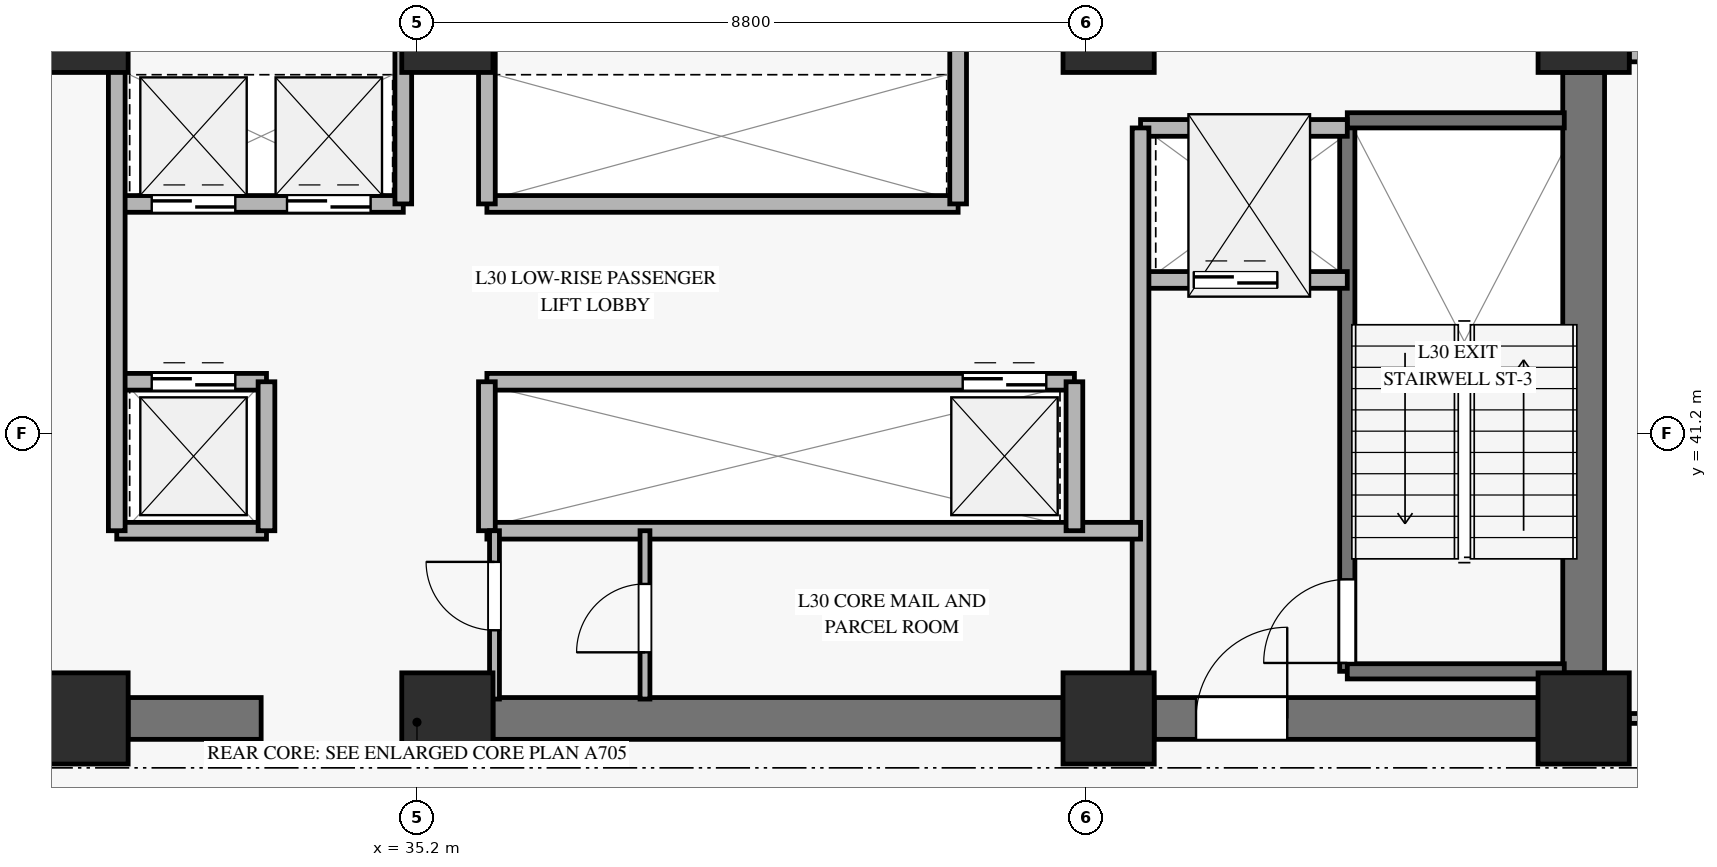
"""IFC4 building model, lengths in metres.
Left out: names, types, materials, properties, quantities, classifications, styles, units other than length and angle.
Written with IfcOpenShell. Run it as: python <this file> out.ifc"""

import sys

from ifc_helpers import new_model, si_unit, direction, frame, frame_2d, origin, origin_2d, place, context, subcontext, project, spatial, rectangle, extrude, source, transform, mapped, element, fill, save


model = new_model("IFC4")
c1 = context("Model", 3, precision=1e-05, world=origin(), true_north=direction((0.0, 1.0)))
c2 = subcontext(c1, "Body", "Model", "MODEL_VIEW")
j1 = project(units=[si_unit("LENGTHUNIT", "METRE"), si_unit("PLANEANGLEUNIT", "RADIAN")], contexts=[c1])
p1 = place(None, origin())
s1 = spatial("IfcSite", under=j1, at=p1, CompositionType="ELEMENT")
p2 = place(p1, origin())
s2 = spatial("IfcBuilding", under=s1, at=p2, CompositionType="ELEMENT")
p3 = place(p2, frame((0.0, 0.0, 123.1)))
s3 = spatial("IfcBuildingStorey", under=s2, at=p3, CompositionType="ELEMENT", Elevation=123.1)
m1 = source(origin(), c2, "Body", "SweptSolid", [
    extrude(rectangle(XDim=1.2, YDim=1.2, at=origin_2d()), origin(), (0.0, 0.0, 1.0), 3.68),
])
for number, where, z_axis, x_axis in (
    (1, (30.8, 37.45, 0.0), (0.0, 0.0, 1.0), (1.0, 0.0, 0.0)),
    (2, (30.8, 46.55, 0.0), (0.0, 0.0, 1.0), (1.0, 0.0, 0.0)),
    (3, (35.6, 37.45, 0.0), (0.0, 0.0, 1.0), (1.0, 0.0, 0.0)),
    (4, (35.6, 46.55, 0.0), (0.0, 0.0, 1.0), (1.0, 0.0, 0.0)),
    (5, (44.3, 37.45, 0.0), (0.0, 0.0, 1.0), (1.0, 0.0, 0.0)),
    (6, (44.3, 46.55, 0.0), (0.0, 0.0, 1.0), (1.0, 0.0, 0.0)),
    (7, (50.55, 37.45, 0.0), (0.0, 0.0, 1.0), (1.0, 0.0, 0.0)),
    (8, (50.55, 46.55, 0.0), (0.0, 0.0, 1.0), (1.0, 0.0, 0.0)),
):
    element("IfcColumn", number, at=place(p3, frame(where, z_axis=z_axis, x_axis=x_axis)), inside=s3, PredefinedType="PILASTER", context=c2, shape_type="MappedRepresentation", body=[
        mapped(m1, transform((0.0, 0.0, 0.0), x_axis=(1.0, 0.0, 0.0), y_axis=(0.0, 1.0, 0.0), z_axis=(0.0, 0.0, 1.0), scale=1.0)),
    ])
p4 = place(p3, frame((31.4, 37.45, 0.0), z_axis=(0.0, 0.0, 1.0), x_axis=(1.0, 0.0, 0.0)))
e9 = element("IfcWall", 9, at=p4, inside=s3, PredefinedType="SHEAR", context=c2, shape_type="SweptSolid", body=[
    extrude(rectangle(XDim=1.75, YDim=0.55, at=frame_2d((0.875, 0.0))), origin(), (0.0, 0.0, 1.0), 3.68),
])
p5 = place(p3, frame((36.2, 37.45, 0.0), z_axis=(0.0, 0.0, 1.0), x_axis=(1.0, 0.0, 0.0)))
e10 = element("IfcWall", 10, at=p5, inside=s3, PredefinedType="SHEAR", context=c2, shape_type="SweptSolid", body=[
    extrude(rectangle(XDim=7.5, YDim=0.55, at=frame_2d((3.75, 0.0))), origin(), (0.0, 0.0, 1.0), 3.68),
])
p6 = place(p3, frame((44.9, 37.45, 0.0), z_axis=(0.0, 0.0, 1.0), x_axis=(1.0, 0.0, 0.0)))
e11 = element("IfcWall", 11, at=p6, inside=s3, PredefinedType="SHEAR", context=c2, shape_type="SweptSolid", body=[
    extrude(rectangle(XDim=5.05, YDim=0.55, at=frame_2d((2.525, 0.0))), origin(), (0.0, 0.0, 1.0), 3.68),
])
p7 = place(p6, frame((0.55, 0.0, 0.0)))
e12 = element("IfcOpeningElement", 12, at=p7, cuts=e11, PredefinedType="OPENING", context=c2, shape_type="SweptSolid", body=[
    extrude(rectangle(XDim=1.2, YDim=2.15, at=frame_2d((0.6, 1.075))), frame((0.0, 0.285, 0.0), z_axis=(0.0, -1.0, 0.0), x_axis=(1.0, 0.0, 0.0)), (0.0, 0.0, 1.0), 0.57),
])
p8 = place(p3, frame((50.55, 38.05, 0.0), z_axis=(0.0, 0.0, 1.0), x_axis=(0.0, 1.0, 0.0)))
e13 = element("IfcWall", 13, at=p8, inside=s3, PredefinedType="SHEAR", context=c2, shape_type="SweptSolid", body=[
    extrude(rectangle(XDim=7.9, YDim=0.55, at=frame_2d((3.95, 0.0))), origin(), (0.0, 0.0, 1.0), 3.68),
])
p9 = place(p3, frame((51.15, 46.25, 0.0), z_axis=(0.0, 0.0, 1.0), x_axis=(1.0, 0.0, 0.0)))
e14 = element("IfcWall", 14, at=p9, inside=s3, PredefinedType="SOLIDWALL", context=c2, shape_type="SweptSolid", body=[
    extrude(rectangle(XDim=10.83, YDim=0.32, at=frame_2d((5.415, 0.0))), origin(), (0.0, 0.0, 1.0), 3.16),
])
p10 = place(p9, frame((4.615, 0.0, 0.45)))
e15 = element("IfcOpeningElement", 15, at=p10, cuts=e14, PredefinedType="OPENING", context=c2, shape_type="SweptSolid", body=[
    extrude(rectangle(XDim=1.6, YDim=2.0, at=frame_2d((0.8, 1.0))), frame((0.0, 0.17, 0.0), z_axis=(0.0, -1.0, 0.0), x_axis=(1.0, 0.0, 0.0)), (0.0, 0.0, 1.0), 0.34),
])
p11 = place(p3, frame((47.44, 38.07, 0.0), z_axis=(0.0, 0.0, 1.0), x_axis=(0.0, 1.0, 0.0)))
e16 = element("IfcWall", 16, at=p11, inside=s3, PredefinedType="SOLIDWALL", context=c2, shape_type="SweptSolid", body=[
    extrude(rectangle(XDim=7.25, YDim=0.2, at=frame_2d((3.625, 0.0))), origin(), (0.0, 0.0, 1.0), 3.9),
])
p12 = place(p11, frame((0.11, 0.0, 0.0)))
e17 = element("IfcOpeningElement", 17, at=p12, cuts=e16, PredefinedType="OPENING", context=c2, shape_type="SweptSolid", body=[
    extrude(rectangle(XDim=1.1, YDim=2.15, at=frame_2d((0.55, 1.075))), frame((0.0, 0.11, 0.0), z_axis=(0.0, -1.0, 0.0), x_axis=(1.0, 0.0, 0.0)), (0.0, 0.0, 1.0), 0.22),
])
for number, where, z_axis, x_axis in (
    (18, (47.44, 45.32, 0.0), (0.0, 0.0, 1.0), (1.0, 0.0, 0.0)),
    (19, (47.44, 38.07, 0.0), (0.0, 0.0, 1.0), (1.0, 0.0, 0.0)),
):
    element("IfcWall", number, at=place(p3, frame(where, z_axis=z_axis, x_axis=x_axis)), inside=s3, PredefinedType="SOLIDWALL", context=c2, shape_type="SweptSolid", body=[
        extrude(rectangle(XDim=2.855, YDim=0.2, at=frame_2d((1.427, 0.0))), origin(), (0.0, 0.0, 1.0), 3.9),
    ])
p13 = place(p3, frame((44.72, 43.22, 0.0), z_axis=(0.0, 0.0, 1.0), x_axis=(1.0, 0.0, 0.0)))
e20 = element("IfcWall", 20, at=p13, inside=s3, PredefinedType="SOLIDWALL", context=c2, shape_type="SweptSolid", body=[
    extrude(rectangle(XDim=2.72, YDim=0.22, at=frame_2d((1.36, 0.0))), origin(), (0.0, 0.0, 1.0), 3.68),
])
p14 = place(p13, frame((0.7, 0.0, 0.0)))
e21 = element("IfcOpeningElement", 21, at=p14, cuts=e20, PredefinedType="OPENING", context=c2, shape_type="SweptSolid", body=[
    extrude(rectangle(XDim=1.1, YDim=2.2, at=frame_2d((0.55, 1.1))), frame((0.0, 0.12, 0.0), z_axis=(0.0, -1.0, 0.0), x_axis=(1.0, 0.0, 0.0)), (0.0, 0.0, 1.0), 0.24),
])
p15 = place(p3, frame((44.72, 45.22, 0.0), z_axis=(0.0, 0.0, 1.0), x_axis=(1.0, 0.0, 0.0)))
e22 = element("IfcWall", 22, at=p15, inside=s3, PredefinedType="SOLIDWALL", context=c2, shape_type="SweptSolid", body=[
    extrude(rectangle(XDim=2.72, YDim=0.22, at=frame_2d((1.36, 0.0))), origin(), (0.0, 0.0, 1.0), 3.68),
])
p16 = place(p3, frame((44.72, 37.705, 0.0), z_axis=(0.0, 0.0, 1.0), x_axis=(0.0, 1.0, 0.0)))
e23 = element("IfcWall", 23, at=p16, inside=s3, PredefinedType="SOLIDWALL", context=c2, shape_type="SweptSolid", body=[
    extrude(rectangle(XDim=7.515, YDim=0.22, at=frame_2d((3.757, 0.0))), origin(), (0.0, 0.0, 1.0), 3.68),
])
p17 = place(p3, frame((31.25, 44.22, 0.0), z_axis=(0.0, 0.0, 1.0), x_axis=(1.0, 0.0, 0.0)))
e24 = element("IfcWall", 24, at=p17, inside=s3, PredefinedType="SOLIDWALL", context=c2, shape_type="SweptSolid", body=[
    extrude(rectangle(XDim=3.77, YDim=0.22, at=frame_2d((1.885, 0.0))), origin(), (0.0, 0.0, 1.0), 3.68),
])
p18 = place(p17, frame((0.46, 0.0, 0.0)))
e25 = element("IfcOpeningElement", 25, at=p18, cuts=e24, PredefinedType="OPENING", context=c2, shape_type="SweptSolid", body=[
    extrude(rectangle(XDim=1.1, YDim=2.2, at=frame_2d((0.55, 1.1))), frame((0.0, 0.12, 0.0), z_axis=(0.0, -1.0, 0.0), x_axis=(1.0, 0.0, 0.0)), (0.0, 0.0, 1.0), 0.24),
])
p19 = place(p17, frame((2.24, 0.0, 0.0)))
e26 = element("IfcOpeningElement", 26, at=p19, cuts=e24, PredefinedType="OPENING", context=c2, shape_type="SweptSolid", body=[
    extrude(rectangle(XDim=1.1, YDim=2.2, at=frame_2d((0.55, 1.1))), frame((0.0, 0.12, 0.0), z_axis=(0.0, -1.0, 0.0), x_axis=(1.0, 0.0, 0.0)), (0.0, 0.0, 1.0), 0.24),
])
p20 = place(p3, frame((36.12, 44.22, 0.0), z_axis=(0.0, 0.0, 1.0), x_axis=(1.0, 0.0, 0.0)))
e27 = element("IfcWall", 27, at=p20, inside=s3, PredefinedType="SOLIDWALL", context=c2, shape_type="SweptSolid", body=[
    extrude(rectangle(XDim=6.2, YDim=0.22, at=frame_2d((3.1, 0.0))), origin(), (0.0, 0.0, 1.0), 3.68),
])
for number, where, z_axis, x_axis in (
    (28, (35.02, 44.22, 0.0), (0.0, 0.0, 1.0), (0.0, 1.0, 0.0)),
    (29, (36.12, 44.22, 0.0), (0.0, 0.0, 1.0), (0.0, 1.0, 0.0)),
    (30, (42.32, 44.22, 0.0), (0.0, 0.0, 1.0), (0.0, 1.0, 0.0)),
):
    element("IfcWall", number, at=place(p3, frame(where, z_axis=z_axis, x_axis=x_axis)), inside=s3, PredefinedType="SOLIDWALL", context=c2, shape_type="SweptSolid", body=[
        extrude(rectangle(XDim=2.075, YDim=0.22, at=frame_2d((1.038, 0.0))), origin(), (0.0, 0.0, 1.0), 3.68),
    ])
p21 = place(p3, frame((31.25, 41.88, 0.0), z_axis=(0.0, 0.0, 1.0), x_axis=(1.0, 0.0, 0.0)))
e31 = element("IfcWall", 31, at=p21, inside=s3, PredefinedType="SOLIDWALL", context=c2, shape_type="SweptSolid", body=[
    extrude(rectangle(XDim=1.97, YDim=0.22, at=frame_2d((0.985, 0.0))), origin(), (0.0, 0.0, 1.0), 3.68),
])
p22 = place(p21, frame((0.46, 0.0, 0.0)))
e32 = element("IfcOpeningElement", 32, at=p22, cuts=e31, PredefinedType="OPENING", context=c2, shape_type="SweptSolid", body=[
    extrude(rectangle(XDim=1.1, YDim=2.2, at=frame_2d((0.55, 1.1))), frame((0.0, 0.12, 0.0), z_axis=(0.0, -1.0, 0.0), x_axis=(1.0, 0.0, 0.0)), (0.0, 0.0, 1.0), 0.24),
])
p23 = place(p3, frame((36.12, 41.88, 0.0), z_axis=(0.0, 0.0, 1.0), x_axis=(1.0, 0.0, 0.0)))
e33 = element("IfcWall", 33, at=p23, inside=s3, PredefinedType="SOLIDWALL", context=c2, shape_type="SweptSolid", body=[
    extrude(rectangle(XDim=7.73, YDim=0.22, at=frame_2d((3.865, 0.0))), origin(), (0.0, 0.0, 1.0), 3.68),
])
p24 = place(p23, frame((6.26, 0.0, 0.0)))
e34 = element("IfcOpeningElement", 34, at=p24, cuts=e33, PredefinedType="OPENING", context=c2, shape_type="SweptSolid", body=[
    extrude(rectangle(XDim=1.1, YDim=2.2, at=frame_2d((0.55, 1.1))), frame((0.0, 0.12, 0.0), z_axis=(0.0, -1.0, 0.0), x_axis=(1.0, 0.0, 0.0)), (0.0, 0.0, 1.0), 0.24),
])
p25 = place(p3, frame((31.25, 39.92, 0.0), z_axis=(0.0, 0.0, 1.0), x_axis=(1.0, 0.0, 0.0)))
e35 = element("IfcWall", 35, at=p25, inside=s3, PredefinedType="SOLIDWALL", context=c2, shape_type="SweptSolid", body=[
    extrude(rectangle(XDim=1.97, YDim=0.22, at=frame_2d((0.985, 0.0))), origin(), (0.0, 0.0, 1.0), 3.68),
])
p26 = place(p3, frame((33.22, 39.92, 0.0), z_axis=(0.0, 0.0, 1.0), x_axis=(0.0, 1.0, 0.0)))
e36 = element("IfcWall", 36, at=p26, inside=s3, PredefinedType="SOLIDWALL", context=c2, shape_type="SweptSolid", body=[
    extrude(rectangle(XDim=1.96, YDim=0.22, at=frame_2d((0.98, 0.0))), origin(), (0.0, 0.0, 1.0), 3.68),
])
p27 = place(p3, frame((36.12, 39.92, 0.0), z_axis=(0.0, 0.0, 1.0), x_axis=(1.0, 0.0, 0.0)))
e37 = element("IfcWall", 37, at=p27, inside=s3, PredefinedType="SOLIDWALL", context=c2, shape_type="SweptSolid", body=[
    extrude(rectangle(XDim=8.6, YDim=0.22, at=frame_2d((4.3, 0.0))), origin(), (0.0, 0.0, 1.0), 2.965),
])
p28 = place(p3, frame((36.12, 39.92, 0.0), z_axis=(0.0, 0.0, 1.0), x_axis=(0.0, 1.0, 0.0)))
e38 = element("IfcWall", 38, at=p28, inside=s3, PredefinedType="SOLIDWALL", context=c2, shape_type="SweptSolid", body=[
    extrude(rectangle(XDim=1.96, YDim=0.22, at=frame_2d((0.98, 0.0))), origin(), (0.0, 0.0, 1.0), 3.68),
])
p29 = place(p3, frame((31.25, 39.92, 0.0), z_axis=(0.0, 0.0, 1.0), x_axis=(0.0, 1.0, 0.0)))
e39 = element("IfcWall", 39, at=p29, inside=s3, PredefinedType="SOLIDWALL", context=c2, shape_type="SweptSolid", body=[
    extrude(rectangle(XDim=6.375, YDim=0.22, at=frame_2d((3.188, 0.0))), origin(), (0.0, 0.0, 1.0), 3.68),
])
p30 = place(p3, frame((43.85, 39.92, 0.0), z_axis=(0.0, 0.0, 1.0), x_axis=(0.0, 1.0, 0.0)))
e40 = element("IfcWall", 40, at=p30, inside=s3, PredefinedType="SOLIDWALL", context=c2, shape_type="SweptSolid", body=[
    extrude(rectangle(XDim=1.96, YDim=0.22, at=frame_2d((0.98, 0.0))), origin(), (0.0, 0.0, 1.0), 3.68),
])
p31 = place(p3, frame((36.22, 37.705, 0.0), z_axis=(0.0, 0.0, 1.0), x_axis=(0.0, 1.0, 0.0)))
e41 = element("IfcWall", 41, at=p31, inside=s3, PredefinedType="PARTITIONING", context=c2, shape_type="SweptSolid", body=[
    extrude(rectangle(XDim=2.215, YDim=0.13, at=frame_2d((1.107, 0.0))), origin(), (0.0, 0.0, 1.0), 3.68),
])
p32 = place(p31, frame((0.905, 0.0, 0.0)))
e42 = element("IfcOpeningElement", 42, at=p32, cuts=e41, PredefinedType="OPENING", context=c2, shape_type="SweptSolid", body=[
    extrude(rectangle(XDim=0.9, YDim=2.1, at=frame_2d((0.45, 1.05))), frame((0.0, 0.075, 0.0), z_axis=(0.0, -1.0, 0.0), x_axis=(1.0, 0.0, 0.0)), (0.0, 0.0, 1.0), 0.15),
])
p33 = place(p3, frame((38.2, 37.705, 0.0), z_axis=(0.0, 0.0, 1.0), x_axis=(0.0, 1.0, 0.0)))
e43 = element("IfcWall", 43, at=p33, inside=s3, PredefinedType="PARTITIONING", context=c2, shape_type="SweptSolid", body=[
    extrude(rectangle(XDim=2.215, YDim=0.13, at=frame_2d((1.107, 0.0))), origin(), (0.0, 0.0, 1.0), 3.68),
])
p34 = place(p33, frame((0.615, 0.0, 0.0)))
e44 = element("IfcOpeningElement", 44, at=p34, cuts=e43, PredefinedType="OPENING", context=c2, shape_type="SweptSolid", body=[
    extrude(rectangle(XDim=0.9, YDim=2.1, at=frame_2d((0.45, 1.05))), frame((0.0, 0.075, 0.0), z_axis=(0.0, -1.0, 0.0), x_axis=(1.0, 0.0, 0.0)), (0.0, 0.0, 1.0), 0.15),
])
p35 = place(p3, frame((51.15, 37.45, 0.0), z_axis=(0.0, 0.0, 1.0), x_axis=(1.0, 0.0, 0.0)))
e45 = element("IfcWall", 45, at=p35, inside=s3, PredefinedType="PARTITIONING", context=c2, shape_type="SweptSolid", body=[
    extrude(rectangle(XDim=14.271, YDim=0.13, at=frame_2d((7.135, 0.0))), origin(), (0.0, 0.0, 1.0), 3.165),
])
p36 = place(p35, frame((0.5, 0.0, 0.0)))
e46 = element("IfcOpeningElement", 46, at=p36, cuts=e45, PredefinedType="OPENING", context=c2, shape_type="SweptSolid", body=[
    extrude(rectangle(XDim=0.9, YDim=2.1, at=frame_2d((0.45, 1.05))), frame((0.0, 0.075, 0.0), z_axis=(0.0, -1.0, 0.0), x_axis=(1.0, 0.0, 0.0)), (0.0, 0.0, 1.0), 0.15),
])
p37 = place(p35, frame((10.43, 0.0, 0.0)))
e47 = element("IfcOpeningElement", 47, at=p37, cuts=e45, PredefinedType="OPENING", context=c2, shape_type="SweptSolid", body=[
    extrude(rectangle(XDim=0.95, YDim=2.1, at=frame_2d((0.475, 1.05))), frame((0.0, 0.075, 0.0), z_axis=(0.0, -1.0, 0.0), x_axis=(1.0, 0.0, 0.0)), (0.0, 0.0, 1.0), 0.15),
])
m2 = source(origin(), c2, "Body", "SweptSolid", [
    extrude(rectangle(XDim=1.1, YDim=2.15, at=frame_2d((0.55, 1.075))), frame((0.0, 0.025, 0.0), z_axis=(0.0, -1.0, 0.0), x_axis=(1.0, 0.0, 0.0)), (0.0, 0.0, 1.0), 0.05),
])
p38 = place(p12, origin())
e48 = element("IfcDoor", 48, at=p38, inside=s3, OperationType="SINGLE_SWING_LEFT", PredefinedType="DOOR", context=c2, shape_type="MappedRepresentation", body=[
    mapped(m2, transform((0.0, 0.0, 0.0), x_axis=(1.0, 0.0, 0.0), y_axis=(0.0, 1.0, 0.0), z_axis=(0.0, 0.0, 1.0), scale=1.0)),
])
fill(e17, e48)
m3 = source(origin(), c2, "Body", "SweptSolid", [
    extrude(rectangle(XDim=1.1, YDim=2.2, at=frame_2d((0.55, 1.1))), frame((0.0, 0.025, 0.0), z_axis=(0.0, -1.0, 0.0), x_axis=(1.0, 0.0, 0.0)), (0.0, 0.0, 1.0), 0.05),
])
p39 = place(p14, origin())
e49 = element("IfcDoor", 49, at=p39, inside=s3, OperationType="SLIDING_TO_LEFT", PredefinedType="DOOR", context=c2, shape_type="MappedRepresentation", body=[
    mapped(m3, transform((0.0, 0.0, 0.0), x_axis=(1.0, 0.0, 0.0), y_axis=(0.0, 1.0, 0.0), z_axis=(0.0, 0.0, 1.0), scale=1.0)),
])
fill(e21, e49)
m4 = source(origin(), c2, "Body", "SweptSolid", [
    extrude(rectangle(XDim=1.2, YDim=2.15, at=frame_2d((0.6, 1.075))), frame((0.0, 0.025, 0.0), z_axis=(0.0, -1.0, 0.0), x_axis=(1.0, 0.0, 0.0)), (0.0, 0.0, 1.0), 0.05),
])
p40 = place(p7, origin())
e50 = element("IfcDoor", 50, at=p40, inside=s3, OperationType="SINGLE_SWING_RIGHT", PredefinedType="DOOR", context=c2, shape_type="MappedRepresentation", body=[
    mapped(m4, transform((0.0, 0.0, 0.0), x_axis=(1.0, 0.0, 0.0), y_axis=(0.0, 1.0, 0.0), z_axis=(0.0, 0.0, 1.0), scale=1.0)),
])
fill(e12, e50)
p41 = place(p18, origin())
e51 = element("IfcDoor", 51, at=p41, inside=s3, OperationType="SLIDING_TO_LEFT", PredefinedType="DOOR", context=c2, shape_type="MappedRepresentation", body=[
    mapped(m3, transform((0.0, 0.0, 0.0), x_axis=(1.0, 0.0, 0.0), y_axis=(0.0, 1.0, 0.0), z_axis=(0.0, 0.0, 1.0), scale=1.0)),
])
fill(e25, e51)
p42 = place(p19, origin())
e52 = element("IfcDoor", 52, at=p42, inside=s3, OperationType="SLIDING_TO_LEFT", PredefinedType="DOOR", context=c2, shape_type="MappedRepresentation", body=[
    mapped(m3, transform((0.0, 0.0, 0.0), x_axis=(1.0, 0.0, 0.0), y_axis=(0.0, 1.0, 0.0), z_axis=(0.0, 0.0, 1.0), scale=1.0)),
])
fill(e26, e52)
p43 = place(p22, origin())
e53 = element("IfcDoor", 53, at=p43, inside=s3, OperationType="SLIDING_TO_LEFT", PredefinedType="DOOR", context=c2, shape_type="MappedRepresentation", body=[
    mapped(m3, transform((0.0, 0.0, 0.0), x_axis=(1.0, 0.0, 0.0), y_axis=(0.0, 1.0, 0.0), z_axis=(0.0, 0.0, 1.0), scale=1.0)),
])
fill(e32, e53)
p44 = place(p24, origin())
e54 = element("IfcDoor", 54, at=p44, inside=s3, OperationType="SLIDING_TO_LEFT", PredefinedType="DOOR", context=c2, shape_type="MappedRepresentation", body=[
    mapped(m3, transform((0.0, 0.0, 0.0), x_axis=(1.0, 0.0, 0.0), y_axis=(0.0, 1.0, 0.0), z_axis=(0.0, 0.0, 1.0), scale=1.0)),
])
fill(e34, e54)
m5 = source(origin(), c2, "Body", "SweptSolid", [
    extrude(rectangle(XDim=0.9, YDim=2.1, at=frame_2d((0.45, 1.05))), frame((0.0, 0.025, 0.0), z_axis=(0.0, -1.0, 0.0), x_axis=(1.0, 0.0, 0.0)), (0.0, 0.0, 1.0), 0.05),
])
p45 = place(p32, origin())
e55 = element("IfcDoor", 55, at=p45, inside=s3, OperationType="SINGLE_SWING_RIGHT", PredefinedType="DOOR", context=c2, shape_type="MappedRepresentation", body=[
    mapped(m5, transform((0.0, 0.0, 0.0), x_axis=(1.0, 0.0, 0.0), y_axis=(0.0, 1.0, 0.0), z_axis=(0.0, 0.0, 1.0), scale=1.0)),
])
fill(e42, e55)
p46 = place(p34, origin())
e56 = element("IfcDoor", 56, at=p46, inside=s3, OperationType="SINGLE_SWING_LEFT", PredefinedType="DOOR", context=c2, shape_type="MappedRepresentation", body=[
    mapped(m5, transform((0.0, 0.0, 0.0), x_axis=(1.0, 0.0, 0.0), y_axis=(0.0, 1.0, 0.0), z_axis=(0.0, 0.0, 1.0), scale=1.0)),
])
fill(e44, e56)
save(model, sys.argv[1])
